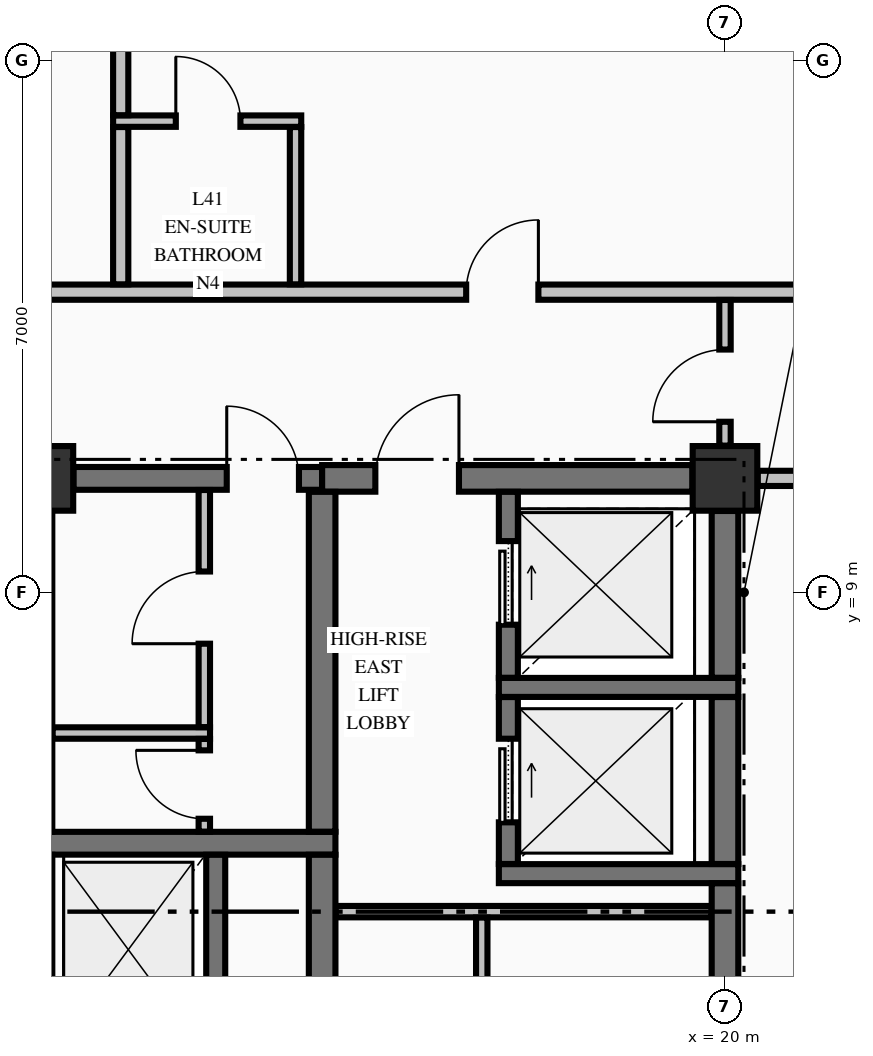
"""IFC4 building model, lengths in metres.
Left out: names, types, materials, properties, quantities, classifications, styles, units other than length and angle.
Written with IfcOpenShell. Run it as: python <this file> out.ifc"""

import sys

from ifc_helpers import new_model, si_unit, direction, frame, frame_2d, origin, origin_2d, place, context, subcontext, project, spatial, rectangle, extrude, element, fill, save


model = new_model("IFC4")
c1 = context("Model", 3, precision=1e-05, world=origin(), true_north=direction((0.0, 1.0)))
c2 = subcontext(c1, "Body", "Model", "MODEL_VIEW")
j1 = project(units=[si_unit("LENGTHUNIT", "METRE"), si_unit("PLANEANGLEUNIT", "RADIAN")], contexts=[c1])
p1 = place(None, origin())
s1 = spatial("IfcSite", under=j1, at=p1, CompositionType="ELEMENT")
p2 = place(p1, origin())
s2 = spatial("IfcBuilding", under=s1, at=p2, CompositionType="ELEMENT")
p3 = place(p2, frame((0.0, 0.0, 162.66)))
s3 = spatial("IfcBuildingStorey", under=s2, at=p3, CompositionType="ELEMENT", Elevation=162.66)
for number, where, z_axis, x_axis in (
    (1, (11.0, 10.5, -0.25), (0.0, 0.0, 1.0), (1.0, 0.0, 0.0)),
    (2, (20.0, 10.5, -0.25), (0.0, 0.0, 1.0), (1.0, 0.0, 0.0)),
):
    element("IfcColumn", number, at=place(p3, frame(where, z_axis=z_axis, x_axis=x_axis)), inside=s3, PredefinedType="COLUMN", context=c2, shape_type="SweptSolid", body=[
        extrude(rectangle(XDim=0.85, YDim=0.85, at=origin_2d()), origin(), (0.0, 0.0, 1.0), 3.4),
    ])
p4 = place(p3, frame((17.025, 5.3, 0.0), z_axis=(0.0, 0.0, 1.0), x_axis=(1.0, 0.0, 0.0)))
e3 = element("IfcWall", 3, at=p4, inside=s3, PredefinedType="SOLIDWALL", context=c2, shape_type="SweptSolid", body=[
    extrude(rectangle(XDim=3.15, YDim=0.25, at=frame_2d((1.575, 0.0))), origin(), (0.0, 0.0, 1.0), 3.15),
])
p5 = place(p3, frame((10.85, 5.7, 0.0), z_axis=(0.0, 0.0, 1.0), x_axis=(1.0, 0.0, 0.0)))
e4 = element("IfcWall", 4, at=p5, inside=s3, PredefinedType="SHEAR", context=c2, shape_type="SweptSolid", body=[
    extrude(rectangle(XDim=4.025, YDim=0.3, at=frame_2d((2.012, 0.0))), origin(), (0.0, 0.0, 1.0), 3.15),
])
p6 = place(p3, frame((17.025, 7.75, 0.0), z_axis=(0.0, 0.0, 1.0), x_axis=(1.0, 0.0, 0.0)))
e5 = element("IfcWall", 5, at=p6, inside=s3, PredefinedType="SOLIDWALL", context=c2, shape_type="SweptSolid", body=[
    extrude(rectangle(XDim=3.15, YDim=0.25, at=frame_2d((1.575, 0.0))), origin(), (0.0, 0.0, 1.0), 3.15),
])
p7 = place(p3, frame((11.429, 10.5, 0.0), z_axis=(0.0, 0.0, 1.0), x_axis=(1.0, 0.0, 0.0)))
e6 = element("IfcWall", 6, at=p7, inside=s3, PredefinedType="SHEAR", context=c2, shape_type="SweptSolid", body=[
    extrude(rectangle(XDim=3.271, YDim=0.3, at=frame_2d((1.635, 0.0))), origin(), (0.0, 0.0, 1.0), 3.15),
])
p8 = place(p7, frame((2.016, 0.0, 0.0)))
e7 = element("IfcOpeningElement", 7, at=p8, cuts=e6, PredefinedType="OPENING", context=c2, shape_type="SweptSolid", body=[
    extrude(rectangle(XDim=0.95, YDim=2.15, at=frame_2d((0.475, 1.075))), frame((0.0, 0.16, 0.0), z_axis=(0.0, -1.0, 0.0), x_axis=(1.0, 0.0, 0.0)), (0.0, 0.0, 1.0), 0.32),
])
p9 = place(p3, frame((14.7, 10.5, 0.0), z_axis=(0.0, 0.0, 1.0), x_axis=(1.0, 0.0, 0.0)))
e8 = element("IfcWall", 8, at=p9, inside=s3, PredefinedType="SHEAR", context=c2, shape_type="SweptSolid", body=[
    extrude(rectangle(XDim=4.871, YDim=0.35, at=frame_2d((2.436, 0.0))), origin(), (0.0, 0.0, 1.0), 3.15),
])
p10 = place(p9, frame((0.7, 0.0, 0.0)))
e9 = element("IfcOpeningElement", 9, at=p10, cuts=e8, PredefinedType="OPENING", context=c2, shape_type="SweptSolid", body=[
    extrude(rectangle(XDim=1.1, YDim=2.15, at=frame_2d((0.55, 1.075))), frame((0.0, 0.185, 0.0), z_axis=(0.0, -1.0, 0.0), x_axis=(1.0, 0.0, 0.0)), (0.0, 0.0, 1.0), 0.37),
])
p11 = place(p3, frame((14.878, 4.8, 0.0), z_axis=(0.0, 0.0, 1.0), x_axis=(1.0, 0.0, 0.0)))
e10 = element("IfcWall", 10, at=p11, inside=s3, PredefinedType="PARTITIONING", context=c2, shape_type="SweptSolid", body=[
    extrude(rectangle(XDim=4.944, YDim=0.15, at=frame_2d((2.472, 0.0))), origin(), (0.0, 0.0, 1.0), 3.15),
])
p12 = place(p3, frame((11.153, 7.15, 0.0), z_axis=(0.0, 0.0, 1.0), x_axis=(1.0, 0.0, 0.0)))
e11 = element("IfcWall", 11, at=p12, inside=s3, PredefinedType="PARTITIONING", context=c2, shape_type="SweptSolid", body=[
    extrude(rectangle(XDim=2.072, YDim=0.15, at=frame_2d((1.036, 0.0))), origin(), (0.0, 0.0, 1.0), 3.15),
])
p13 = place(p3, frame((20.431, 10.5, 0.0), z_axis=(0.0, 0.0, 1.0), x_axis=(1.0, 0.0, 0.0)))
e12 = element("IfcWall", 12, at=p13, inside=s3, PredefinedType="PARTITIONING", context=c2, shape_type="SweptSolid", body=[
    extrude(rectangle(XDim=6.404, YDim=0.2, at=frame_2d((3.202, 0.0))), origin(), (0.0, 0.0, 1.0), 3.15),
])
p14 = place(p13, frame((2.594, 0.0, 0.0)))
e13 = element("IfcOpeningElement", 13, at=p14, cuts=e12, PredefinedType="OPENING", context=c2, shape_type="SweptSolid", body=[
    extrude(rectangle(XDim=0.95, YDim=2.15, at=frame_2d((0.475, 1.075))), frame((0.0, 0.11, 0.0), z_axis=(0.0, -1.0, 0.0), x_axis=(1.0, 0.0, 0.0)), (0.0, 0.0, 1.0), 0.22),
])
p15 = place(p3, frame((-17.1, 12.95, 0.0), z_axis=(0.0, 0.0, 1.0), x_axis=(1.0, 0.0, 0.0)))
e14 = element("IfcWall", 14, at=p15, inside=s3, PredefinedType="PARTITIONING", context=c2, shape_type="SweptSolid", body=[
    extrude(rectangle(XDim=39.2, YDim=0.2, at=frame_2d((19.6, 0.0))), origin(), (0.0, 0.0, 1.0), 3.15),
])
p16 = place(p15, frame((3.695, 0.0, 0.0)))
e15 = element("IfcOpeningElement", 15, at=p16, cuts=e14, PredefinedType="OPENING", context=c2, shape_type="SweptSolid", body=[
    extrude(rectangle(XDim=0.95, YDim=2.15, at=frame_2d((0.475, 1.075))), frame((0.0, 0.11, 0.0), z_axis=(0.0, -1.0, 0.0), x_axis=(1.0, 0.0, 0.0)), (0.0, 0.0, 1.0), 0.22),
])
p17 = place(p15, frame((12.925, 0.0, 0.0)))
e16 = element("IfcOpeningElement", 16, at=p17, cuts=e14, PredefinedType="OPENING", context=c2, shape_type="SweptSolid", body=[
    extrude(rectangle(XDim=0.95, YDim=2.15, at=frame_2d((0.475, 1.075))), frame((0.0, 0.11, 0.0), z_axis=(0.0, -1.0, 0.0), x_axis=(1.0, 0.0, 0.0)), (0.0, 0.0, 1.0), 0.22),
])
p18 = place(p15, frame((24.525, 0.0, 0.0)))
e17 = element("IfcOpeningElement", 17, at=p18, cuts=e14, PredefinedType="OPENING", context=c2, shape_type="SweptSolid", body=[
    extrude(rectangle(XDim=0.95, YDim=2.15, at=frame_2d((0.475, 1.075))), frame((0.0, 0.11, 0.0), z_axis=(0.0, -1.0, 0.0), x_axis=(1.0, 0.0, 0.0)), (0.0, 0.0, 1.0), 0.22),
])
p19 = place(p15, frame((33.695, 0.0, 0.0)))
e18 = element("IfcOpeningElement", 18, at=p19, cuts=e14, PredefinedType="OPENING", context=c2, shape_type="SweptSolid", body=[
    extrude(rectangle(XDim=0.95, YDim=2.15, at=frame_2d((0.475, 1.075))), frame((0.0, 0.11, 0.0), z_axis=(0.0, -1.0, 0.0), x_axis=(1.0, 0.0, 0.0)), (0.0, 0.0, 1.0), 0.22),
])
p20 = place(p3, frame((11.95, 15.2, 0.0), z_axis=(0.0, 0.0, 1.0), x_axis=(1.0, 0.0, 0.0)))
e19 = element("IfcWall", 19, at=p20, inside=s3, PredefinedType="PARTITIONING", context=c2, shape_type="SweptSolid", body=[
    extrude(rectangle(XDim=2.475, YDim=0.15, at=frame_2d((1.238, 0.0))), origin(), (0.0, 0.0, 1.0), 3.15),
])
p21 = place(p20, frame((0.825, 0.0, 0.0)))
e20 = element("IfcOpeningElement", 20, at=p21, cuts=e19, PredefinedType="OPENING", context=c2, shape_type="SweptSolid", body=[
    extrude(rectangle(XDim=0.85, YDim=2.1, at=frame_2d((0.425, 1.05))), frame((0.0, 0.085, 0.0), z_axis=(0.0, -1.0, 0.0), x_axis=(1.0, 0.0, 0.0)), (0.0, 0.0, 1.0), 0.17),
])
p22 = place(p3, frame((11.0, 3.052, 0.0), z_axis=(0.0, 0.0, 1.0), x_axis=(0.0, 1.0, 0.0)))
e21 = element("IfcWall", 21, at=p22, inside=s3, PredefinedType="SHEAR", context=c2, shape_type="SweptSolid", body=[
    extrude(rectangle(XDim=2.496, YDim=0.3, at=frame_2d((1.248, 0.0))), origin(), (0.0, 0.0, 1.0), 3.15),
])
p23 = place(p3, frame((11.0, 5.852, 0.0), z_axis=(0.0, 0.0, 1.0), x_axis=(0.0, 1.0, 0.0)))
e22 = element("IfcWall", 22, at=p23, inside=s3, PredefinedType="SHEAR", context=c2, shape_type="SweptSolid", body=[
    extrude(rectangle(XDim=4.219, YDim=0.3, at=frame_2d((2.109, 0.0))), origin(), (0.0, 0.0, 1.0), 3.15),
])
p24 = place(p3, frame((13.3, 3.052, 0.0), z_axis=(0.0, 0.0, 1.0), x_axis=(0.0, 1.0, 0.0)))
e23 = element("IfcWall", 23, at=p24, inside=s3, PredefinedType="SOLIDWALL", context=c2, shape_type="SweptSolid", body=[
    extrude(rectangle(XDim=2.496, YDim=0.25, at=frame_2d((1.248, 0.0))), origin(), (0.0, 0.0, 1.0), 3.15),
])
p25 = place(p3, frame((14.7, 3.052, 0.0), z_axis=(0.0, 0.0, 1.0), x_axis=(0.0, 1.0, 0.0)))
e24 = element("IfcWall", 24, at=p25, inside=s3, PredefinedType="SHEAR", context=c2, shape_type="SweptSolid", body=[
    extrude(rectangle(XDim=2.496, YDim=0.35, at=frame_2d((1.248, 0.0))), origin(), (0.0, 0.0, 1.0), 3.15),
])
p26 = place(p3, frame((14.7, 5.852, 0.0), z_axis=(0.0, 0.0, 1.0), x_axis=(0.0, 1.0, 0.0)))
e25 = element("IfcWall", 25, at=p26, inside=s3, PredefinedType="SHEAR", context=c2, shape_type="SweptSolid", body=[
    extrude(rectangle(XDim=4.471, YDim=0.35, at=frame_2d((2.235, 0.0))), origin(), (0.0, 0.0, 1.0), 3.15),
])
p27 = place(p3, frame((17.15, 5.427, 0.0), z_axis=(0.0, 0.0, 1.0), x_axis=(0.0, 1.0, 0.0)))
e26 = element("IfcWall", 26, at=p27, inside=s3, PredefinedType="SOLIDWALL", context=c2, shape_type="SweptSolid", body=[
    extrude(rectangle(XDim=2.196, YDim=0.25, at=frame_2d((1.098, 0.0))), origin(), (0.0, 0.0, 1.0), 3.15),
])
p28 = place(p27, frame((0.548, 0.0, 0.0)))
e27 = element("IfcOpeningElement", 27, at=p28, cuts=e26, PredefinedType="OPENING", context=c2, shape_type="SweptSolid", body=[
    extrude(rectangle(XDim=1.1, YDim=2.2, at=frame_2d((0.55, 1.1))), frame((0.0, 0.135, 0.0), z_axis=(0.0, -1.0, 0.0), x_axis=(1.0, 0.0, 0.0)), (0.0, 0.0, 1.0), 0.27),
])
p29 = place(p3, frame((17.15, 7.877, 0.0), z_axis=(0.0, 0.0, 1.0), x_axis=(0.0, 1.0, 0.0)))
e28 = element("IfcWall", 28, at=p29, inside=s3, PredefinedType="SOLIDWALL", context=c2, shape_type="SweptSolid", body=[
    extrude(rectangle(XDim=2.446, YDim=0.25, at=frame_2d((1.223, 0.0))), origin(), (0.0, 0.0, 1.0), 3.15),
])
p30 = place(p29, frame((0.698, 0.0, 0.0)))
e29 = element("IfcOpeningElement", 29, at=p30, cuts=e28, PredefinedType="OPENING", context=c2, shape_type="SweptSolid", body=[
    extrude(rectangle(XDim=1.1, YDim=2.2, at=frame_2d((0.55, 1.1))), frame((0.0, 0.135, 0.0), z_axis=(0.0, -1.0, 0.0), x_axis=(1.0, 0.0, 0.0)), (0.0, 0.0, 1.0), 0.27),
])
p31 = place(p3, frame((20.0, 0.429, 0.0), z_axis=(0.0, 0.0, 1.0), x_axis=(0.0, 1.0, 0.0)))
e30 = element("IfcWall", 30, at=p31, inside=s3, PredefinedType="SHEAR", context=c2, shape_type="SweptSolid", body=[
    extrude(rectangle(XDim=4.744, YDim=0.35, at=frame_2d((2.372, 0.0))), origin(), (0.0, 0.0, 1.0), 3.15),
])
p32 = place(p3, frame((20.0, 5.427, 0.0), z_axis=(0.0, 0.0, 1.0), x_axis=(0.0, 1.0, 0.0)))
e31 = element("IfcWall", 31, at=p32, inside=s3, PredefinedType="SHEAR", context=c2, shape_type="SweptSolid", body=[
    extrude(rectangle(XDim=2.196, YDim=0.35, at=frame_2d((1.098, 0.0))), origin(), (0.0, 0.0, 1.0), 3.15),
])
p33 = place(p3, frame((20.0, 7.877, 0.0), z_axis=(0.0, 0.0, 1.0), x_axis=(0.0, 1.0, 0.0)))
e32 = element("IfcWall", 32, at=p33, inside=s3, PredefinedType="SHEAR", context=c2, shape_type="SweptSolid", body=[
    extrude(rectangle(XDim=2.194, YDim=0.35, at=frame_2d((1.097, 0.0))), origin(), (0.0, 0.0, 1.0), 3.15),
])
p34 = place(p3, frame((12.05, 13.053, 0.0), z_axis=(0.0, 0.0, 1.0), x_axis=(0.0, 1.0, 0.0)))
e33 = element("IfcWall", 33, at=p34, inside=s3, PredefinedType="PARTITIONING", context=c2, shape_type="SweptSolid", body=[
    extrude(rectangle(XDim=2.069, YDim=0.2, at=frame_2d((1.035, 0.0))), origin(), (0.0, 0.0, 1.0), 3.15),
])
p35 = place(p3, frame((12.05, 15.278, 0.0), z_axis=(0.0, 0.0, 1.0), x_axis=(0.0, 1.0, 0.0)))
e34 = element("IfcWall", 34, at=p35, inside=s3, PredefinedType="PARTITIONING", context=c2, shape_type="SweptSolid", body=[
    extrude(rectangle(XDim=9.057, YDim=0.2, at=frame_2d((4.528, 0.0))), origin(), (0.0, 0.0, 1.0), 3.15),
])
p36 = place(p3, frame((13.15, 5.853, 0.0), z_axis=(0.0, 0.0, 1.0), x_axis=(0.0, 1.0, 0.0)))
e35 = element("IfcWall", 35, at=p36, inside=s3, PredefinedType="PARTITIONING", context=c2, shape_type="SweptSolid", body=[
    extrude(rectangle(XDim=1.219, YDim=0.15, at=frame_2d((0.609, 0.0))), origin(), (0.0, 0.0, 1.0), 3.15),
])
p37 = place(p36, frame((0.169, 0.0, 0.0)))
e36 = element("IfcOpeningElement", 36, at=p37, cuts=e35, PredefinedType="OPENING", context=c2, shape_type="SweptSolid", body=[
    extrude(rectangle(XDim=0.9, YDim=2.15, at=frame_2d((0.45, 1.075))), frame((0.0, 0.085, 0.0), z_axis=(0.0, -1.0, 0.0), x_axis=(1.0, 0.0, 0.0)), (0.0, 0.0, 1.0), 0.17),
])
p38 = place(p3, frame((13.15, 7.228, 0.0), z_axis=(0.0, 0.0, 1.0), x_axis=(0.0, 1.0, 0.0)))
e37 = element("IfcWall", 37, at=p38, inside=s3, PredefinedType="PARTITIONING", context=c2, shape_type="SweptSolid", body=[
    extrude(rectangle(XDim=3.119, YDim=0.15, at=frame_2d((1.56, 0.0))), origin(), (0.0, 0.0, 1.0), 3.15),
])
p39 = place(p38, frame((1.097, 0.0, 0.0)))
e38 = element("IfcOpeningElement", 38, at=p39, cuts=e37, PredefinedType="OPENING", context=c2, shape_type="SweptSolid", body=[
    extrude(rectangle(XDim=0.95, YDim=2.15, at=frame_2d((0.475, 1.075))), frame((0.0, 0.085, 0.0), z_axis=(0.0, -1.0, 0.0), x_axis=(1.0, 0.0, 0.0)), (0.0, 0.0, 1.0), 0.17),
])
p40 = place(p3, frame((14.35, 13.053, 0.0), z_axis=(0.0, 0.0, 1.0), x_axis=(0.0, 1.0, 0.0)))
e39 = element("IfcWall", 39, at=p40, inside=s3, PredefinedType="PARTITIONING", context=c2, shape_type="SweptSolid", body=[
    extrude(rectangle(XDim=2.069, YDim=0.15, at=frame_2d((1.035, 0.0))), origin(), (0.0, 0.0, 1.0), 3.15),
])
p41 = place(p3, frame((16.8, -2.422, 0.0), z_axis=(0.0, 0.0, 1.0), x_axis=(0.0, 1.0, 0.0)))
e40 = element("IfcWall", 40, at=p41, inside=s3, PredefinedType="PARTITIONING", context=c2, shape_type="SweptSolid", body=[
    extrude(rectangle(XDim=7.144, YDim=0.15, at=frame_2d((3.572, 0.0))), origin(), (0.0, 0.0, 1.0), 3.15),
])
p42 = place(p3, frame((20.0, 10.931, 0.0), z_axis=(0.0, 0.0, 1.0), x_axis=(0.0, 1.0, 0.0)))
e41 = element("IfcWall", 41, at=p42, inside=s3, PredefinedType="PARTITIONING", context=c2, shape_type="SweptSolid", body=[
    extrude(rectangle(XDim=1.916, YDim=0.15, at=frame_2d((0.958, 0.0))), origin(), (0.0, 0.0, 1.0), 2.342),
])
p43 = place(p42, frame((0.314, 0.0, 0.0)))
e42 = element("IfcOpeningElement", 42, at=p43, cuts=e41, PredefinedType="OPENING", context=c2, shape_type="SweptSolid", body=[
    extrude(rectangle(XDim=0.95, YDim=2.15, at=frame_2d((0.475, 1.075))), frame((0.0, 0.085, 0.0), z_axis=(0.0, -1.0, 0.0), x_axis=(1.0, 0.0, 0.0)), (0.0, 0.0, 1.0), 0.17),
])
p44 = place(p8, origin())
e43 = element("IfcDoor", 43, at=p44, inside=s3, OperationType="SINGLE_SWING_LEFT", PredefinedType="DOOR", context=c2, shape_type="SweptSolid", body=[
    extrude(rectangle(XDim=0.95, YDim=2.15, at=frame_2d((0.475, 1.075))), frame((0.0, 0.025, 0.0), z_axis=(0.0, -1.0, 0.0), x_axis=(1.0, 0.0, 0.0)), (0.0, 0.0, 1.0), 0.05),
])
fill(e7, e43)
p45 = place(p37, origin())
e44 = element("IfcDoor", 44, at=p45, inside=s3, OperationType="SINGLE_SWING_RIGHT", PredefinedType="DOOR", context=c2, shape_type="SweptSolid", body=[
    extrude(rectangle(XDim=0.9, YDim=2.15, at=frame_2d((0.45, 1.075))), frame((0.0, 0.025, 0.0), z_axis=(0.0, -1.0, 0.0), x_axis=(1.0, 0.0, 0.0)), (0.0, 0.0, 1.0), 0.05),
])
fill(e36, e44)
p46 = place(p39, origin())
e45 = element("IfcDoor", 45, at=p46, inside=s3, OperationType="SINGLE_SWING_LEFT", PredefinedType="DOOR", context=c2, shape_type="SweptSolid", body=[
    extrude(rectangle(XDim=0.95, YDim=2.15, at=frame_2d((0.475, 1.075))), frame((0.0, 0.025, 0.0), z_axis=(0.0, -1.0, 0.0), x_axis=(1.0, 0.0, 0.0)), (0.0, 0.0, 1.0), 0.05),
])
fill(e38, e45)
p47 = place(p28, origin())
e46 = element("IfcDoor", 46, at=p47, inside=s3, OperationType="SLIDING_TO_RIGHT", PredefinedType="DOOR", context=c2, shape_type="SweptSolid", body=[
    extrude(rectangle(XDim=1.1, YDim=2.2, at=frame_2d((0.55, 1.1))), frame((0.0, 0.025, 0.0), z_axis=(0.0, -1.0, 0.0), x_axis=(1.0, 0.0, 0.0)), (0.0, 0.0, 1.0), 0.05),
])
fill(e27, e46)
p48 = place(p30, origin())
e47 = element("IfcDoor", 47, at=p48, inside=s3, OperationType="SLIDING_TO_RIGHT", PredefinedType="DOOR", context=c2, shape_type="SweptSolid", body=[
    extrude(rectangle(XDim=1.1, YDim=2.2, at=frame_2d((0.55, 1.1))), frame((0.0, 0.025, 0.0), z_axis=(0.0, -1.0, 0.0), x_axis=(1.0, 0.0, 0.0)), (0.0, 0.0, 1.0), 0.05),
])
fill(e29, e47)
p49 = place(p10, origin())
e48 = element("IfcDoor", 48, at=p49, inside=s3, OperationType="SINGLE_SWING_RIGHT", PredefinedType="DOOR", context=c2, shape_type="SweptSolid", body=[
    extrude(rectangle(XDim=1.1, YDim=2.15, at=frame_2d((0.55, 1.075))), frame((0.0, 0.025, 0.0), z_axis=(0.0, -1.0, 0.0), x_axis=(1.0, 0.0, 0.0)), (0.0, 0.0, 1.0), 0.05),
])
fill(e9, e48)
p50 = place(p19, origin())
e49 = element("IfcDoor", 49, at=p50, inside=s3, OperationType="SINGLE_SWING_RIGHT", PredefinedType="DOOR", context=c2, shape_type="SweptSolid", body=[
    extrude(rectangle(XDim=0.95, YDim=2.15, at=frame_2d((0.475, 1.075))), frame((0.0, 0.025, 0.0), z_axis=(0.0, -1.0, 0.0), x_axis=(1.0, 0.0, 0.0)), (0.0, 0.0, 1.0), 0.05),
])
fill(e18, e49)
p51 = place(p21, origin())
e50 = element("IfcDoor", 50, at=p51, inside=s3, OperationType="SINGLE_SWING_LEFT", PredefinedType="DOOR", context=c2, shape_type="SweptSolid", body=[
    extrude(rectangle(XDim=0.85, YDim=2.1, at=frame_2d((0.425, 1.05))), frame((0.0, 0.025, 0.0), z_axis=(0.0, -1.0, 0.0), x_axis=(1.0, 0.0, 0.0)), (0.0, 0.0, 1.0), 0.05),
])
fill(e20, e50)
p52 = place(p43, origin())
e51 = element("IfcDoor", 51, at=p52, inside=s3, OperationType="SINGLE_SWING_LEFT", PredefinedType="DOOR", context=c2, shape_type="SweptSolid", body=[
    extrude(rectangle(XDim=0.95, YDim=2.15, at=frame_2d((0.475, 1.075))), frame((0.0, 0.025, 0.0), z_axis=(0.0, -1.0, 0.0), x_axis=(1.0, 0.0, 0.0)), (0.0, 0.0, 1.0), 0.05),
])
fill(e42, e51)
save(model, sys.argv[1])
